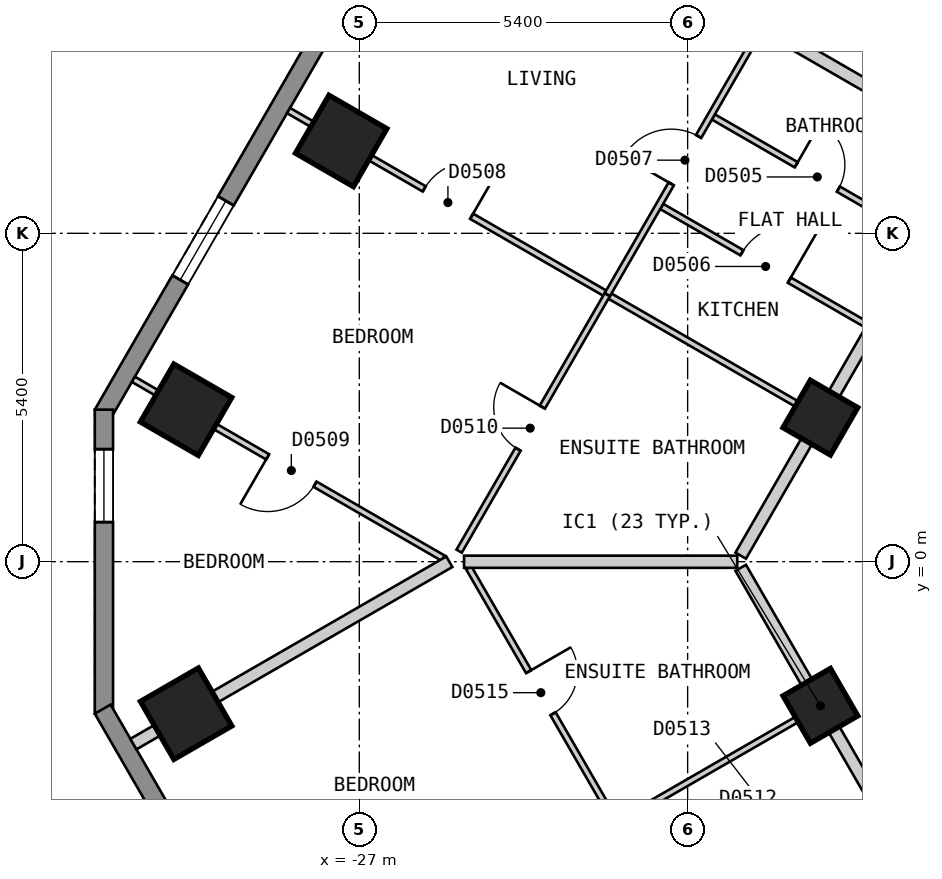
"""IFC4 building model, lengths in metres.
Left out: names, types, materials, properties, quantities, classifications, styles, units other than length and angle.
Written with IfcOpenShell. Run it as: python <this file> out.ifc"""

import sys

from ifc_helpers import new_model, si_unit, direction, frame, frame_2d, origin, origin_2d, place, context, subcontext, project, spatial, polyline, rectangle, outline, extrude, element, fill, save


model = new_model("IFC4")
c1 = context("Model", 3, precision=1e-05, world=origin(), true_north=direction((0.0, 1.0)))
c2 = subcontext(c1, "Body", "Model", "MODEL_VIEW")
j1 = project(units=[si_unit("LENGTHUNIT", "METRE"), si_unit("PLANEANGLEUNIT", "RADIAN")], contexts=[c1])
p1 = place(None, origin())
s1 = spatial("IfcSite", under=j1, at=p1, CompositionType="ELEMENT")
p2 = place(p1, origin())
s2 = spatial("IfcBuilding", under=s1, at=p2, CompositionType="ELEMENT")
p3 = place(p2, frame((0.0, 0.0, 44.4)))
s3 = spatial("IfcBuildingStorey", under=s2, at=p3, CompositionType="ELEMENT", Elevation=44.4)
for number, where, z_axis, x_axis in (
    (1, (-27.298, 6.919, 0.0), (0.0, 0.0, 1.0), (-0.5, -0.866, 0.0)),
    (2, (-29.849, 2.499, 0.0), (0.0, 0.0, 1.0), (-0.5, -0.866, 0.0)),
    (3, (-29.848, -2.5, 0.0), (0.0, 0.0, 1.0), (0.5, -0.866, 0.0)),
):
    element("IfcColumn", number, at=place(p3, frame(where, z_axis=z_axis, x_axis=x_axis)), inside=s3, PredefinedType="COLUMN", context=c2, shape_type="SweptSolid", body=[
        extrude(rectangle(XDim=1.1, YDim=1.1, at=origin_2d()), origin(), (0.0, 0.0, 1.0), 3.0),
    ])
for number, where, z_axis, x_axis in (
    (4, (-19.416, -2.371, 0.0), (0.0, 0.0, 1.0), (0.5, -0.866, 0.0)),
    (5, (-19.417, 2.369, 0.0), (0.0, 0.0, 1.0), (-0.5, -0.866, 0.0)),
):
    element("IfcColumn", number, at=place(p3, frame(where, z_axis=z_axis, x_axis=x_axis)), inside=s3, PredefinedType="COLUMN", context=c2, shape_type="SweptSolid", body=[
        extrude(rectangle(XDim=0.9, YDim=0.9, at=origin_2d()), origin(), (0.0, 0.0, 1.0), 3.0),
    ])
p4 = place(p3, frame((-17.71, 25.825, 0.0), z_axis=(0.0, 0.0, 1.0), x_axis=(-0.500001938803, -0.866024284413, 0.0)))
e6 = element("IfcWall", 6, at=p4, inside=s3, PredefinedType="SOLIDWALL", context=c2, shape_type="SweptSolid", body=[
    extrude(outline(polyline([(0.0, -0.15), (27.02, -0.15), (26.94, 0.15), (0.08, 0.15), (0.0, -0.15)])), origin(), (0.0, 0.0, 1.0), 2.7),
])
p5 = place(p4, frame((2.553, 0.0, 0.15)))
e7 = element("IfcOpeningElement", 7, at=p5, cuts=e6, PredefinedType="OPENING", context=c2, shape_type="SweptSolid", body=[
    extrude(rectangle(XDim=1.5, YDim=2.1, at=frame_2d((0.75, 1.05))), frame((0.0, 0.16, 0.0), z_axis=(0.0, -1.0, 0.0), x_axis=(1.0, 0.0, 0.0)), (0.0, 0.0, 1.0), 0.32),
])
p6 = place(p4, frame((7.658, 0.0, 0.15)))
e8 = element("IfcOpeningElement", 8, at=p6, cuts=e6, PredefinedType="OPENING", context=c2, shape_type="SweptSolid", body=[
    extrude(rectangle(XDim=1.5, YDim=2.1, at=frame_2d((0.75, 1.05))), frame((0.0, 0.16, 0.0), z_axis=(0.0, -1.0, 0.0), x_axis=(1.0, 0.0, 0.0)), (0.0, 0.0, 1.0), 0.32),
])
p7 = place(p4, frame((12.761, 0.0, 0.15)))
e9 = element("IfcOpeningElement", 9, at=p7, cuts=e6, PredefinedType="OPENING", context=c2, shape_type="SweptSolid", body=[
    extrude(rectangle(XDim=1.5, YDim=2.1, at=frame_2d((0.75, 1.05))), frame((0.0, 0.16, 0.0), z_axis=(0.0, -1.0, 0.0), x_axis=(1.0, 0.0, 0.0)), (0.0, 0.0, 1.0), 0.32),
])
p8 = place(p4, frame((17.865, 0.0, 0.15)))
e10 = element("IfcOpeningElement", 10, at=p8, cuts=e6, PredefinedType="OPENING", context=c2, shape_type="SweptSolid", body=[
    extrude(rectangle(XDim=1.5, YDim=2.1, at=frame_2d((0.75, 1.05))), frame((0.0, 0.16, 0.0), z_axis=(0.0, -1.0, 0.0), x_axis=(1.0, 0.0, 0.0)), (0.0, 0.0, 1.0), 0.32),
])
p9 = place(p4, frame((22.969, 0.0, 0.15)))
e11 = element("IfcOpeningElement", 11, at=p9, cuts=e6, PredefinedType="OPENING", context=c2, shape_type="SweptSolid", body=[
    extrude(rectangle(XDim=1.5, YDim=2.1, at=frame_2d((0.75, 1.05))), frame((0.0, 0.16, 0.0), z_axis=(0.0, -1.0, 0.0), x_axis=(1.0, 0.0, 0.0)), (0.0, 0.0, 1.0), 0.32),
])
p10 = place(p3, frame((-31.2, 2.5, 0.0), z_axis=(0.0, 0.0, 1.0), x_axis=(0.0, -1.0, 0.0)))
e12 = element("IfcWall", 12, at=p10, inside=s3, PredefinedType="SOLIDWALL", context=c2, shape_type="SweptSolid", body=[
    extrude(outline(polyline([(0.0, -0.15), (5.0, -0.15), (4.92, 0.15), (0.08, 0.15), (0.0, -0.15)])), origin(), (0.0, 0.0, 1.0), 2.7),
])
p11 = place(p10, frame((0.65, 0.0, 0.15)))
e13 = element("IfcOpeningElement", 13, at=p11, cuts=e12, PredefinedType="OPENING", context=c2, shape_type="SweptSolid", body=[
    extrude(rectangle(XDim=1.2, YDim=2.1, at=frame_2d((0.6, 1.05))), frame((0.0, 0.16, 0.0), z_axis=(0.0, -1.0, 0.0), x_axis=(1.0, 0.0, 0.0)), (0.0, 0.0, 1.0), 0.32),
])
p12 = place(p3, frame((-31.22, -2.425, 0.0), z_axis=(0.0, 0.0, 1.0), x_axis=(0.500001938803, -0.866024284413, 0.0)))
e14 = element("IfcWall", 14, at=p12, inside=s3, PredefinedType="SOLIDWALL", context=c2, shape_type="SweptSolid", body=[
    extrude(outline(polyline([(0.0, -0.15), (27.02, -0.15), (26.94, 0.15), (0.08, 0.15), (0.0, -0.15)])), origin(), (0.0, 0.0, 1.0), 2.7),
])
p13 = place(p12, frame((2.553, 0.0, 0.15)))
e15 = element("IfcOpeningElement", 15, at=p13, cuts=e14, PredefinedType="OPENING", context=c2, shape_type="SweptSolid", body=[
    extrude(rectangle(XDim=1.5, YDim=2.1, at=frame_2d((0.75, 1.05))), frame((0.0, 0.16, 0.0), z_axis=(0.0, -1.0, 0.0), x_axis=(1.0, 0.0, 0.0)), (0.0, 0.0, 1.0), 0.32),
])
p14 = place(p12, frame((7.657, 0.0, 0.15)))
e16 = element("IfcOpeningElement", 16, at=p14, cuts=e14, PredefinedType="OPENING", context=c2, shape_type="SweptSolid", body=[
    extrude(rectangle(XDim=1.5, YDim=2.1, at=frame_2d((0.75, 1.05))), frame((0.0, 0.16, 0.0), z_axis=(0.0, -1.0, 0.0), x_axis=(1.0, 0.0, 0.0)), (0.0, 0.0, 1.0), 0.32),
])
p15 = place(p12, frame((12.761, 0.0, 0.15)))
e17 = element("IfcOpeningElement", 17, at=p15, cuts=e14, PredefinedType="OPENING", context=c2, shape_type="SweptSolid", body=[
    extrude(rectangle(XDim=1.5, YDim=2.1, at=frame_2d((0.75, 1.05))), frame((0.0, 0.16, 0.0), z_axis=(0.0, -1.0, 0.0), x_axis=(1.0, 0.0, 0.0)), (0.0, 0.0, 1.0), 0.32),
])
p16 = place(p12, frame((17.865, 0.0, 0.15)))
e18 = element("IfcOpeningElement", 18, at=p16, cuts=e14, PredefinedType="OPENING", context=c2, shape_type="SweptSolid", body=[
    extrude(rectangle(XDim=1.5, YDim=2.1, at=frame_2d((0.75, 1.05))), frame((0.0, 0.16, 0.0), z_axis=(0.0, -1.0, 0.0), x_axis=(1.0, 0.0, 0.0)), (0.0, 0.0, 1.0), 0.32),
])
p17 = place(p12, frame((22.969, 0.0, 0.15)))
e19 = element("IfcOpeningElement", 19, at=p17, cuts=e14, PredefinedType="OPENING", context=c2, shape_type="SweptSolid", body=[
    extrude(rectangle(XDim=1.5, YDim=2.1, at=frame_2d((0.75, 1.05))), frame((0.0, 0.16, 0.0), z_axis=(0.0, -1.0, 0.0), x_axis=(1.0, 0.0, 0.0)), (0.0, 0.0, 1.0), 0.32),
])
p18 = place(p3, frame((-20.727, -0.101, 0.0), z_axis=(0.0, 0.0, 1.0), x_axis=(0.500065652488, -0.865987495984, 0.0)))
e20 = element("IfcWall", 20, at=p18, inside=s3, PredefinedType="PARTITIONING", context=c2, shape_type="SweptSolid", body=[
    extrude(rectangle(XDim=7.389, YDim=0.2, at=frame_2d((3.695, 0.0))), origin(), (0.0, 0.0, 1.0), 2.7),
])
p19 = place(p18, frame((4.937, 0.0, 0.0)))
e21 = element("IfcOpeningElement", 21, at=p19, cuts=e20, PredefinedType="OPENING", context=c2, shape_type="SweptSolid", body=[
    extrude(rectangle(XDim=1.0, YDim=2.1, at=frame_2d((0.5, 1.05))), frame((0.0, 0.11, 0.0), z_axis=(0.0, -1.0, 0.0), x_axis=(1.0, 0.0, 0.0)), (0.0, 0.0, 1.0), 0.22),
])
p20 = place(p3, frame((-20.727, 0.099, 0.0), z_axis=(0.0, 0.0, 1.0), x_axis=(0.499993204491, 0.866029327138, 0.0)))
e22 = element("IfcWall", 22, at=p20, inside=s3, PredefinedType="PARTITIONING", context=c2, shape_type="SweptSolid", body=[
    extrude(rectangle(XDim=20.554, YDim=0.2, at=frame_2d((10.277, 0.0))), origin(), (0.0, 0.0, 1.0), 2.7),
])
p21 = place(p20, frame((9.776, 0.0, 0.0)))
e23 = element("IfcOpeningElement", 23, at=p21, cuts=e22, PredefinedType="OPENING", context=c2, shape_type="SweptSolid", body=[
    extrude(rectangle(XDim=1.0, YDim=2.1, at=frame_2d((0.5, 1.05))), frame((0.0, 0.11, 0.0), z_axis=(0.0, -1.0, 0.0), x_axis=(1.0, 0.0, 0.0)), (0.0, 0.0, 1.0), 0.22),
])
p22 = place(p20, frame((4.673, 0.0, 0.0)))
e24 = element("IfcOpeningElement", 24, at=p22, cuts=e22, PredefinedType="OPENING", context=c2, shape_type="SweptSolid", body=[
    extrude(rectangle(XDim=1.0, YDim=2.1, at=frame_2d((0.5, 1.05))), frame((0.0, 0.11, 0.0), z_axis=(0.0, -1.0, 0.0), x_axis=(1.0, 0.0, 0.0)), (0.0, 0.0, 1.0), 0.22),
])
p23 = place(p20, frame((14.88, 0.0, 0.0)))
e25 = element("IfcOpeningElement", 25, at=p23, cuts=e22, PredefinedType="OPENING", context=c2, shape_type="SweptSolid", body=[
    extrude(rectangle(XDim=1.0, YDim=2.1, at=frame_2d((0.5, 1.05))), frame((0.0, 0.11, 0.0), z_axis=(0.0, -1.0, 0.0), x_axis=(1.0, 0.0, 0.0)), (0.0, 0.0, 1.0), 0.22),
])
p24 = place(p3, frame((-25.2, -0.101, 0.0), z_axis=(0.0, 0.0, 1.0), x_axis=(0.500099052605, -0.865968208183, 0.0)))
e26 = element("IfcWall", 26, at=p24, inside=s3, PredefinedType="PARTITIONING", context=c2, shape_type="SweptSolid", body=[
    extrude(rectangle(XDim=4.807, YDim=0.1, at=frame_2d((2.404, 0.0))), origin(), (0.0, 0.0, 1.0), 2.7),
])
p25 = place(p24, frame((1.971, 0.0, 0.0)))
e27 = element("IfcOpeningElement", 27, at=p25, cuts=e26, PredefinedType="OPENING", context=c2, shape_type="SweptSolid", body=[
    extrude(rectangle(XDim=0.8, YDim=2.1, at=frame_2d((0.4, 1.05))), frame((0.0, 0.06, 0.0), z_axis=(0.0, -1.0, 0.0), x_axis=(1.0, 0.0, 0.0)), (0.0, 0.0, 1.0), 0.12),
])
p26 = place(p3, frame((-21.177, 7.314, 0.0), z_axis=(0.0, 0.0, 1.0), x_axis=(0.865979019114, -0.500080332001, 0.0)))
e28 = element("IfcWall", 28, at=p26, inside=s3, PredefinedType="PARTITIONING", context=c2, shape_type="SweptSolid", body=[
    extrude(rectangle(XDim=3.897, YDim=0.1, at=frame_2d((1.949, 0.0))), origin(), (0.0, 0.0, 1.0), 2.7),
])
p27 = place(p26, frame((1.574, 0.0, 0.0)))
e29 = element("IfcOpeningElement", 29, at=p27, cuts=e28, PredefinedType="OPENING", context=c2, shape_type="SweptSolid", body=[
    extrude(rectangle(XDim=0.8, YDim=2.1, at=frame_2d((0.4, 1.05))), frame((0.0, 0.06, 0.0), z_axis=(0.0, -1.0, 0.0), x_axis=(1.0, 0.0, 0.0)), (0.0, 0.0, 1.0), 0.12),
])
p28 = place(p3, frame((-22.027, 5.842, 0.0), z_axis=(0.0, 0.0, 1.0), x_axis=(0.865979019114, -0.500080332001, 0.0)))
e30 = element("IfcWall", 30, at=p28, inside=s3, PredefinedType="PARTITIONING", context=c2, shape_type="SweptSolid", body=[
    extrude(rectangle(XDim=3.897, YDim=0.1, at=frame_2d((1.949, 0.0))), origin(), (0.0, 0.0, 1.0), 2.7),
])
p29 = place(p28, frame((1.524, 0.0, 0.0)))
e31 = element("IfcOpeningElement", 31, at=p29, cuts=e30, PredefinedType="OPENING", context=c2, shape_type="SweptSolid", body=[
    extrude(rectangle(XDim=0.9, YDim=2.1, at=frame_2d((0.45, 1.05))), frame((0.0, 0.06, 0.0), z_axis=(0.0, -1.0, 0.0), x_axis=(1.0, 0.0, 0.0)), (0.0, 0.0, 1.0), 0.12),
])
p30 = place(p3, frame((-28.164, 7.419, 0.0), z_axis=(0.0, 0.0, 1.0), x_axis=(0.866047370643, -0.499961950354, 0.0)))
e32 = element("IfcWall", 32, at=p30, inside=s3, PredefinedType="PARTITIONING", context=c2, shape_type="SweptSolid", body=[
    extrude(rectangle(XDim=10.001, YDim=0.1, at=frame_2d((5.0, 0.0))), origin(), (0.0, 0.0, 1.0), 2.7),
])
p31 = place(p30, frame((2.577, 0.0, 0.0)))
e33 = element("IfcOpeningElement", 33, at=p31, cuts=e32, PredefinedType="OPENING", context=c2, shape_type="SweptSolid", body=[
    extrude(rectangle(XDim=0.9, YDim=2.1, at=frame_2d((0.45, 1.05))), frame((0.0, 0.06, 0.0), z_axis=(0.0, -1.0, 0.0), x_axis=(1.0, 0.0, 0.0)), (0.0, 0.0, 1.0), 0.12),
])
p32 = place(p3, frame((-30.716, 2.999, 0.0), z_axis=(0.0, 0.0, 1.0), x_axis=(0.866025981722, -0.499998998981, 0.0)))
e34 = element("IfcWall", 34, at=p32, inside=s3, PredefinedType="PARTITIONING", context=c2, shape_type="SweptSolid", body=[
    extrude(rectangle(XDim=5.884, YDim=0.1, at=frame_2d((2.942, 0.0))), origin(), (0.0, 0.0, 1.0), 2.7),
])
p33 = place(p32, frame((2.55, 0.0, 0.0)))
e35 = element("IfcOpeningElement", 35, at=p33, cuts=e34, PredefinedType="OPENING", context=c2, shape_type="SweptSolid", body=[
    extrude(rectangle(XDim=0.9, YDim=2.1, at=frame_2d((0.45, 1.05))), frame((0.0, 0.06, 0.0), z_axis=(0.0, -1.0, 0.0), x_axis=(1.0, 0.0, 0.0)), (0.0, 0.0, 1.0), 0.12),
])
p34 = place(p3, frame((-25.358, 0.173, 0.0), z_axis=(0.0, 0.0, 1.0), x_axis=(0.500180754623, 0.8659210199, 0.0)))
e36 = element("IfcWall", 36, at=p34, inside=s3, PredefinedType="PARTITIONING", context=c2, shape_type="SweptSolid", body=[
    extrude(rectangle(XDim=4.872, YDim=0.1, at=frame_2d((2.436, 0.0))), origin(), (0.0, 0.0, 1.0), 2.7),
])
p35 = place(p34, frame((1.936, 0.0, 0.0)))
e37 = element("IfcOpeningElement", 37, at=p35, cuts=e36, PredefinedType="OPENING", context=c2, shape_type="SweptSolid", body=[
    extrude(rectangle(XDim=0.8, YDim=2.1, at=frame_2d((0.4, 1.05))), frame((0.0, 0.06, 0.0), z_axis=(0.0, -1.0, 0.0), x_axis=(1.0, 0.0, 0.0)), (0.0, 0.0, 1.0), 0.12),
])
p36 = place(p3, frame((-28.163, -7.42, 0.0), z_axis=(0.0, 0.0, 1.0), x_axis=(0.866065245018, 0.499930986609, 0.0)))
e38 = element("IfcWall", 38, at=p36, inside=s3, PredefinedType="PARTITIONING", context=c2, shape_type="SweptSolid", body=[
    extrude(rectangle(XDim=10.0, YDim=0.1, at=frame_2d((5.0, 0.0))), origin(), (0.0, 0.0, 1.0), 2.7),
])
p37 = place(p36, frame((2.663, 0.0, 0.0)))
e39 = element("IfcOpeningElement", 39, at=p37, cuts=e38, PredefinedType="OPENING", context=c2, shape_type="SweptSolid", body=[
    extrude(rectangle(XDim=0.9, YDim=2.1, at=frame_2d((0.45, 1.05))), frame((0.0, 0.06, 0.0), z_axis=(0.0, -1.0, 0.0), x_axis=(1.0, 0.0, 0.0)), (0.0, 0.0, 1.0), 0.12),
])
p38 = place(p3, frame((-25.611, 11.839, 0.0), z_axis=(0.0, 0.0, 1.0), x_axis=(0.866022959057, -0.500004234368, 0.0)))
e40 = element("IfcWall", 40, at=p38, inside=s3, PredefinedType="PARTITIONING", context=c2, shape_type="SweptSolid", body=[
    extrude(rectangle(XDim=10.0, YDim=0.2, at=frame_2d((5.0, 0.0))), origin(), (0.0, 0.0, 1.0), 2.7),
])
p39 = place(p3, frame((-25.277, -0.001, 0.0), z_axis=(0.0, 0.0, 1.0), x_axis=(1.0, 0.0, 0.0)))
e41 = element("IfcWall", 41, at=p39, inside=s3, PredefinedType="PARTITIONING", context=c2, shape_type="SweptSolid", body=[
    extrude(rectangle(XDim=4.493, YDim=0.2, at=frame_2d((2.247, 0.0))), origin(), (0.0, 0.0, 1.0), 2.7),
])
p40 = place(p3, frame((-30.715, -3.0, 0.0), z_axis=(0.0, 0.0, 1.0), x_axis=(0.86609140076, 0.499885672459, 0.0)))
e42 = element("IfcWall", 42, at=p40, inside=s3, PredefinedType="PARTITIONING", context=c2, shape_type="SweptSolid", body=[
    extrude(rectangle(XDim=6.0, YDim=0.2, at=frame_2d((3.0, 0.0))), origin(), (0.0, 0.0, 1.0), 2.7),
])
p41 = place(p3, frame((-22.921, 4.392, 0.0), z_axis=(0.0, 0.0, 1.0), x_axis=(0.499958946799, 0.866049104564, 0.0)))
e43 = element("IfcWall", 43, at=p41, inside=s3, PredefinedType="PARTITIONING", context=c2, shape_type="SweptSolid", body=[
    extrude(rectangle(XDim=5.004, YDim=0.1, at=frame_2d((2.502, 0.0))), origin(), (0.0, 0.0, 1.0), 2.7),
])
p42 = place(p41, frame((2.103, 0.0, 0.0)))
e44 = element("IfcOpeningElement", 44, at=p42, cuts=e43, PredefinedType="OPENING", context=c2, shape_type="SweptSolid", body=[
    extrude(rectangle(XDim=0.9, YDim=2.1, at=frame_2d((0.45, 1.05))), frame((0.0, 0.06, 0.0), z_axis=(0.0, -1.0, 0.0), x_axis=(1.0, 0.0, 0.0)), (0.0, 0.0, 1.0), 0.12),
])
p43 = place(p9, origin())
e45 = element("IfcWindow", 45, at=p43, inside=s3, PartitioningType="SINGLE_PANEL", PredefinedType="WINDOW", context=c2, shape_type="SweptSolid", body=[
    extrude(rectangle(XDim=1.5, YDim=2.1, at=frame_2d((0.75, 1.05))), frame((0.0, 0.03, 0.0), z_axis=(0.0, -1.0, 0.0), x_axis=(1.0, 0.0, 0.0)), (0.0, 0.0, 1.0), 0.06),
])
fill(e11, e45)
p44 = place(p11, origin())
e46 = element("IfcWindow", 46, at=p44, inside=s3, PartitioningType="SINGLE_PANEL", PredefinedType="WINDOW", context=c2, shape_type="SweptSolid", body=[
    extrude(rectangle(XDim=1.2, YDim=2.1, at=frame_2d((0.6, 1.05))), frame((0.0, 0.03, 0.0), z_axis=(0.0, -1.0, 0.0), x_axis=(1.0, 0.0, 0.0)), (0.0, 0.0, 1.0), 0.06),
])
fill(e13, e46)
p45 = place(p27, origin())
e47 = element("IfcDoor", 47, at=p45, inside=s3, OperationType="SINGLE_SWING_LEFT", PredefinedType="DOOR", context=c2, shape_type="SweptSolid", body=[
    extrude(rectangle(XDim=0.8, YDim=2.1, at=frame_2d((0.4, 1.05))), frame((0.0, 0.025, 0.0), z_axis=(0.0, -1.0, 0.0), x_axis=(1.0, 0.0, 0.0)), (0.0, 0.0, 1.0), 0.05),
])
fill(e29, e47)
p46 = place(p29, origin())
e48 = element("IfcDoor", 48, at=p46, inside=s3, OperationType="SINGLE_SWING_RIGHT", PredefinedType="DOOR", context=c2, shape_type="SweptSolid", body=[
    extrude(rectangle(XDim=0.9, YDim=2.1, at=frame_2d((0.45, 1.05))), frame((0.0, 0.025, 0.0), z_axis=(0.0, -1.0, 0.0), x_axis=(1.0, 0.0, 0.0)), (0.0, 0.0, 1.0), 0.05),
])
fill(e31, e48)
p47 = place(p42, origin())
e49 = element("IfcDoor", 49, at=p47, inside=s3, OperationType="SINGLE_SWING_LEFT", PredefinedType="DOOR", context=c2, shape_type="SweptSolid", body=[
    extrude(rectangle(XDim=0.9, YDim=2.1, at=frame_2d((0.45, 1.05))), frame((0.0, 0.025, 0.0), z_axis=(0.0, -1.0, 0.0), x_axis=(1.0, 0.0, 0.0)), (0.0, 0.0, 1.0), 0.05),
])
fill(e44, e49)
p48 = place(p31, origin())
e50 = element("IfcDoor", 50, at=p48, inside=s3, OperationType="SINGLE_SWING_RIGHT", PredefinedType="DOOR", context=c2, shape_type="SweptSolid", body=[
    extrude(rectangle(XDim=0.9, YDim=2.1, at=frame_2d((0.45, 1.05))), frame((0.0, 0.025, 0.0), z_axis=(0.0, -1.0, 0.0), x_axis=(1.0, 0.0, 0.0)), (0.0, 0.0, 1.0), 0.05),
])
fill(e33, e50)
p49 = place(p33, origin())
e51 = element("IfcDoor", 51, at=p49, inside=s3, OperationType="SINGLE_SWING_LEFT", PredefinedType="DOOR", context=c2, shape_type="SweptSolid", body=[
    extrude(rectangle(XDim=0.9, YDim=2.1, at=frame_2d((0.45, 1.05))), frame((0.0, 0.025, 0.0), z_axis=(0.0, -1.0, 0.0), x_axis=(1.0, 0.0, 0.0)), (0.0, 0.0, 1.0), 0.05),
])
fill(e35, e51)
p50 = place(p35, origin())
e52 = element("IfcDoor", 52, at=p50, inside=s3, OperationType="SINGLE_SWING_RIGHT", PredefinedType="DOOR", context=c2, shape_type="SweptSolid", body=[
    extrude(rectangle(XDim=0.8, YDim=2.1, at=frame_2d((0.4, 1.05))), frame((0.0, 0.025, 0.0), z_axis=(0.0, -1.0, 0.0), x_axis=(1.0, 0.0, 0.0)), (0.0, 0.0, 1.0), 0.05),
])
fill(e37, e52)
p51 = place(p25, origin())
e53 = element("IfcDoor", 53, at=p51, inside=s3, OperationType="SINGLE_SWING_LEFT", PredefinedType="DOOR", context=c2, shape_type="SweptSolid", body=[
    extrude(rectangle(XDim=0.8, YDim=2.1, at=frame_2d((0.4, 1.05))), frame((0.0, 0.025, 0.0), z_axis=(0.0, -1.0, 0.0), x_axis=(1.0, 0.0, 0.0)), (0.0, 0.0, 1.0), 0.05),
])
fill(e27, e53)
save(model, sys.argv[1])
